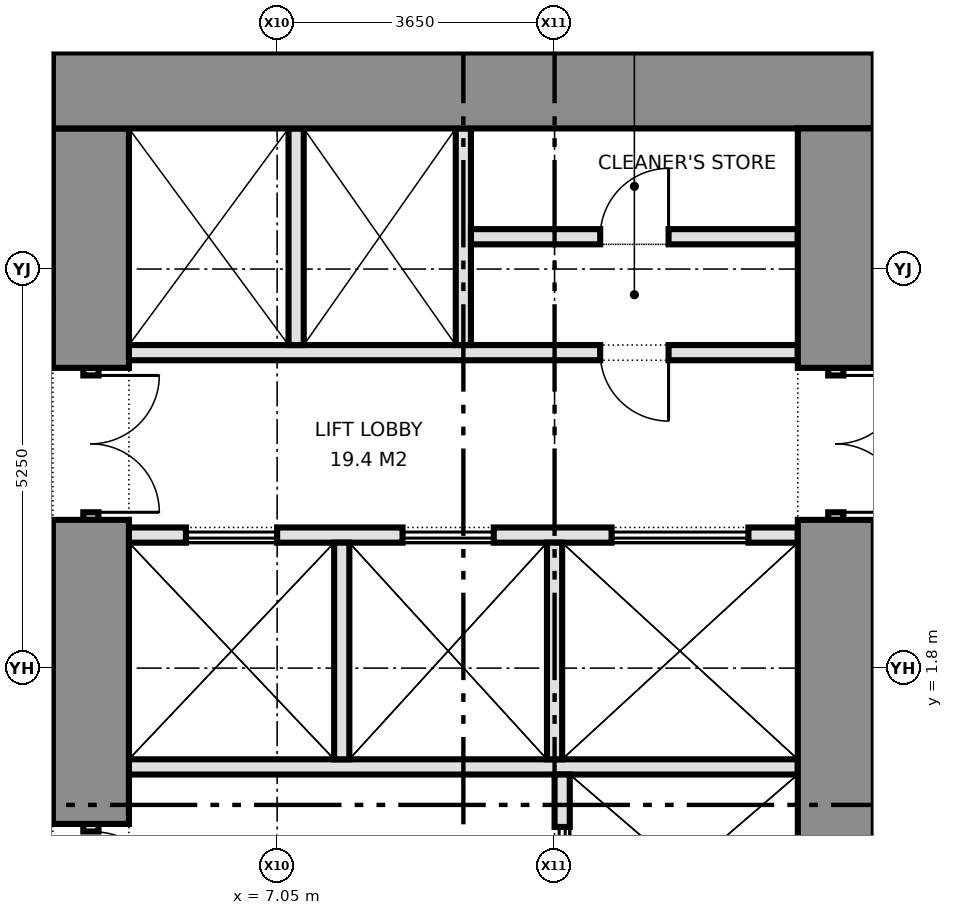
"""IFC4 building model, lengths in metres.
Left out: names, types, materials, properties, quantities, classifications, styles, units other than length and angle.
Written with IfcOpenShell. Run it as: python <this file> out.ifc"""

import sys

from ifc_helpers import new_model, si_unit, direction, frame, frame_2d, origin, place, context, subcontext, project, spatial, rectangle, extrude, element, fill, save


model = new_model("IFC4")
c1 = context("Model", 3, precision=1e-05, world=origin(), true_north=direction((0.0, 1.0)))
c2 = subcontext(c1, "Body", "Model", "MODEL_VIEW")
j1 = project(units=[si_unit("LENGTHUNIT", "METRE"), si_unit("PLANEANGLEUNIT", "RADIAN")], contexts=[c1])
p1 = place(None, origin())
s1 = spatial("IfcSite", under=j1, at=p1, CompositionType="ELEMENT")
p2 = place(p1, origin())
s2 = spatial("IfcBuilding", under=s1, at=p2, CompositionType="ELEMENT")
p3 = place(p2, frame((0.0, 0.0, 90.8)))
s3 = spatial("IfcBuildingStorey", under=s2, at=p3, CompositionType="ELEMENT", Elevation=90.8)
p4 = place(p3, frame((14.9, 9.4, 0.0), z_axis=(0.0, 0.0, 1.0), x_axis=(-1.0, 0.0, 0.0)))
e1 = element("IfcWall", 1, at=p4, inside=s3, PredefinedType="SHEAR", context=c2, shape_type="SweptSolid", body=[
    extrude(rectangle(XDim=10.8, YDim=1.0, at=frame_2d((5.4, 0.0))), origin(), (0.0, 0.0, 1.0), 4.2),
])
p5 = place(p3, frame((14.4, 8.9, 0.0), z_axis=(0.0, 0.0, 1.0), x_axis=(0.0, -1.0, 0.0)))
e2 = element("IfcWall", 2, at=p5, inside=s3, PredefinedType="SHEAR", context=c2, shape_type="SweptSolid", body=[
    extrude(rectangle(XDim=3.15, YDim=1.0, at=frame_2d((1.575, 0.0))), origin(), (0.0, 0.0, 1.0), 4.2),
])
p6 = place(p3, frame((14.4, 5.75, 0.0), z_axis=(0.0, 0.0, 1.0), x_axis=(0.0, -1.0, 0.0)))
e3 = element("IfcWall", 3, at=p6, inside=s3, PredefinedType="PARTITIONING", context=c2, shape_type="SweptSolid", body=[
    extrude(rectangle(XDim=2.0, YDim=0.2, at=frame_2d((1.0, 0.0))), origin(), (0.0, 0.0, 1.0), 2.4),
])
p7 = place(p6, frame((0.1, 0.0, 0.0)))
e4 = element("IfcOpeningElement", 4, at=p7, cuts=e3, PredefinedType="OPENING", context=c2, shape_type="SweptSolid", body=[
    extrude(rectangle(XDim=1.8, YDim=2.1, at=frame_2d((0.9, 1.05))), frame((0.0, 0.11, 0.0), z_axis=(0.0, -1.0, 0.0), x_axis=(1.0, 0.0, 0.0)), (0.0, 0.0, 1.0), 0.22),
])
p8 = place(p3, frame((14.4, 3.75, 0.0), z_axis=(0.0, 0.0, 1.0), x_axis=(0.0, -1.0, 0.0)))
e5 = element("IfcWall", 5, at=p8, inside=s3, PredefinedType="SHEAR", context=c2, shape_type="SweptSolid", body=[
    extrude(rectangle(XDim=6.13, YDim=1.0, at=frame_2d((3.065, 0.0))), origin(), (0.0, 0.0, 1.0), 4.2),
])
p9 = place(p3, frame((4.6, 8.9, 0.0), z_axis=(0.0, 0.0, 1.0), x_axis=(0.0, -1.0, 0.0)))
e6 = element("IfcWall", 6, at=p9, inside=s3, PredefinedType="SHEAR", context=c2, shape_type="SweptSolid", body=[
    extrude(rectangle(XDim=3.15, YDim=1.0, at=frame_2d((1.575, 0.0))), origin(), (0.0, 0.0, 1.0), 4.2),
])
p10 = place(p3, frame((4.6, 5.75, 0.0), z_axis=(0.0, 0.0, 1.0), x_axis=(0.0, -1.0, 0.0)))
e7 = element("IfcWall", 7, at=p10, inside=s3, PredefinedType="PARTITIONING", context=c2, shape_type="SweptSolid", body=[
    extrude(rectangle(XDim=2.0, YDim=0.2, at=frame_2d((1.0, 0.0))), origin(), (0.0, 0.0, 1.0), 2.4),
])
p11 = place(p10, frame((0.1, 0.0, 0.0)))
e8 = element("IfcOpeningElement", 8, at=p11, cuts=e7, PredefinedType="OPENING", context=c2, shape_type="SweptSolid", body=[
    extrude(rectangle(XDim=1.8, YDim=2.1, at=frame_2d((0.9, 1.05))), frame((0.0, 0.11, 0.0), z_axis=(0.0, -1.0, 0.0), x_axis=(1.0, 0.0, 0.0)), (0.0, 0.0, 1.0), 0.22),
])
p12 = place(p3, frame((4.6, 3.75, 0.0), z_axis=(0.0, 0.0, 1.0), x_axis=(0.0, -1.0, 0.0)))
e9 = element("IfcWall", 9, at=p12, inside=s3, PredefinedType="SHEAR", context=c2, shape_type="SweptSolid", body=[
    extrude(rectangle(XDim=4.0, YDim=1.0, at=frame_2d((2.0, 0.0))), origin(), (0.0, 0.0, 1.0), 4.2),
])
p13 = place(p3, frame((4.6, -0.25, 0.0), z_axis=(0.0, 0.0, 1.0), x_axis=(0.0, -1.0, 0.0)))
e10 = element("IfcWall", 10, at=p13, inside=s3, PredefinedType="PARTITIONING", context=c2, shape_type="SweptSolid", body=[
    extrude(rectangle(XDim=1.3, YDim=0.2, at=frame_2d((0.65, 0.0))), origin(), (0.0, 0.0, 1.0), 2.4),
])
p14 = place(p13, frame((0.1, 0.0, 0.0)))
e11 = element("IfcOpeningElement", 11, at=p14, cuts=e10, PredefinedType="OPENING", context=c2, shape_type="SweptSolid", body=[
    extrude(rectangle(XDim=1.1, YDim=2.1, at=frame_2d((0.55, 1.05))), frame((0.0, 0.11, 0.0), z_axis=(0.0, -1.0, 0.0), x_axis=(1.0, 0.0, 0.0)), (0.0, 0.0, 1.0), 0.22),
])
p15 = place(p3, frame((13.9, 5.95, 0.0), z_axis=(0.0, 0.0, 1.0), x_axis=(-1.0, 0.0, 0.0)))
e12 = element("IfcWall", 12, at=p15, inside=s3, PredefinedType="PARTITIONING", context=c2, shape_type="SweptSolid", body=[
    extrude(rectangle(XDim=8.8, YDim=0.2, at=frame_2d((4.4, 0.0))), origin(), (0.0, 0.0, 1.0), 4.2),
])
p16 = place(p15, frame((1.7, 0.0, 0.0)))
e13 = element("IfcOpeningElement", 13, at=p16, cuts=e12, PredefinedType="OPENING", context=c2, shape_type="SweptSolid", body=[
    extrude(rectangle(XDim=0.9, YDim=2.1, at=frame_2d((0.45, 1.05))), frame((0.0, 0.11, 0.0), z_axis=(0.0, -1.0, 0.0), x_axis=(1.0, 0.0, 0.0)), (0.0, 0.0, 1.0), 0.22),
])
p17 = place(p3, frame((13.9, 3.55, 0.0), z_axis=(0.0, 0.0, 1.0), x_axis=(-1.0, 0.0, 0.0)))
e14 = element("IfcWall", 14, at=p17, inside=s3, PredefinedType="PARTITIONING", context=c2, shape_type="SweptSolid", body=[
    extrude(rectangle(XDim=8.8, YDim=0.2, at=frame_2d((4.4, 0.0))), origin(), (0.0, 0.0, 1.0), 4.2),
])
p18 = place(p17, frame((0.65, 0.0, 0.0)))
e15 = element("IfcOpeningElement", 15, at=p18, cuts=e14, PredefinedType="OPENING", context=c2, shape_type="SweptSolid", body=[
    extrude(rectangle(XDim=1.8, YDim=2.1, at=frame_2d((0.9, 1.05))), frame((0.0, 0.11, 0.0), z_axis=(0.0, -1.0, 0.0), x_axis=(1.0, 0.0, 0.0)), (0.0, 0.0, 1.0), 0.22),
])
p19 = place(p17, frame((4.0, 0.0, 0.0)))
e16 = element("IfcOpeningElement", 16, at=p19, cuts=e14, PredefinedType="OPENING", context=c2, shape_type="SweptSolid", body=[
    extrude(rectangle(XDim=1.2, YDim=2.1, at=frame_2d((0.6, 1.05))), frame((0.0, 0.11, 0.0), z_axis=(0.0, -1.0, 0.0), x_axis=(1.0, 0.0, 0.0)), (0.0, 0.0, 1.0), 0.22),
])
p20 = place(p17, frame((6.85, 0.0, 0.0)))
e17 = element("IfcOpeningElement", 17, at=p20, cuts=e14, PredefinedType="OPENING", context=c2, shape_type="SweptSolid", body=[
    extrude(rectangle(XDim=1.2, YDim=2.1, at=frame_2d((0.6, 1.05))), frame((0.0, 0.11, 0.0), z_axis=(0.0, -1.0, 0.0), x_axis=(1.0, 0.0, 0.0)), (0.0, 0.0, 1.0), 0.22),
])
p21 = place(p3, frame((13.9, 0.5, 0.0), z_axis=(0.0, 0.0, 1.0), x_axis=(-1.0, 0.0, 0.0)))
e18 = element("IfcWall", 18, at=p21, inside=s3, PredefinedType="PARTITIONING", context=c2, shape_type="SweptSolid", body=[
    extrude(rectangle(XDim=8.8, YDim=0.2, at=frame_2d((4.4, 0.0))), origin(), (0.0, 0.0, 1.0), 4.2),
])
p22 = place(p3, frame((10.8, 0.4, 0.0), z_axis=(0.0, 0.0, 1.0), x_axis=(0.0, -1.0, 0.0)))
e19 = element("IfcWall", 19, at=p22, inside=s3, PredefinedType="PARTITIONING", context=c2, shape_type="SweptSolid", body=[
    extrude(rectangle(XDim=2.58, YDim=0.2, at=frame_2d((1.29, 0.0))), origin(), (0.0, 0.0, 1.0), 4.2),
])
p23 = place(p22, frame((0.69, 0.0, 0.0)))
e20 = element("IfcOpeningElement", 20, at=p23, cuts=e19, PredefinedType="OPENING", context=c2, shape_type="SweptSolid", body=[
    extrude(rectangle(XDim=1.2, YDim=2.1, at=frame_2d((0.6, 1.05))), frame((0.0, 0.11, 0.0), z_axis=(0.0, -1.0, 0.0), x_axis=(1.0, 0.0, 0.0)), (0.0, 0.0, 1.0), 0.22),
])
for number, where, z_axis, x_axis in (
    (21, (9.5, 8.9, 0.0), (0.0, 0.0, 1.0), (0.0, -1.0, 0.0)),
    (22, (7.3, 8.9, 0.0), (0.0, 0.0, 1.0), (0.0, -1.0, 0.0)),
):
    element("IfcWall", number, at=place(p3, frame(where, z_axis=z_axis, x_axis=x_axis)), inside=s3, PredefinedType="PARTITIONING", context=c2, shape_type="SweptSolid", body=[
        extrude(rectangle(XDim=2.85, YDim=0.2, at=frame_2d((1.425, 0.0))), origin(), (0.0, 0.0, 1.0), 4.2),
    ])
p24 = place(p3, frame((13.9, 7.475, 0.0), z_axis=(0.0, 0.0, 1.0), x_axis=(-1.0, 0.0, 0.0)))
e23 = element("IfcWall", 23, at=p24, inside=s3, PredefinedType="PARTITIONING", context=c2, shape_type="SweptSolid", body=[
    extrude(rectangle(XDim=4.3, YDim=0.2, at=frame_2d((2.15, 0.0))), origin(), (0.0, 0.0, 1.0), 4.2),
])
p25 = place(p24, frame((1.7, 0.0, 0.0)))
e24 = element("IfcOpeningElement", 24, at=p25, cuts=e23, PredefinedType="OPENING", context=c2, shape_type="SweptSolid", body=[
    extrude(rectangle(XDim=0.9, YDim=2.1, at=frame_2d((0.45, 1.05))), frame((0.0, 0.11, 0.0), z_axis=(0.0, -1.0, 0.0), x_axis=(1.0, 0.0, 0.0)), (0.0, 0.0, 1.0), 0.22),
])
for number, where, z_axis, x_axis in (
    (25, (10.7, 3.45, 0.0), (0.0, 0.0, 1.0), (0.0, -1.0, 0.0)),
    (26, (7.9, 3.45, 0.0), (0.0, 0.0, 1.0), (0.0, -1.0, 0.0)),
):
    element("IfcWall", number, at=place(p3, frame(where, z_axis=z_axis, x_axis=x_axis)), inside=s3, PredefinedType="PARTITIONING", context=c2, shape_type="SweptSolid", body=[
        extrude(rectangle(XDim=2.85, YDim=0.2, at=frame_2d((1.425, 0.0))), origin(), (0.0, 0.0, 1.0), 4.2),
    ])
p26 = place(p7, origin())
e27 = element("IfcDoor", 27, at=p26, inside=s3, OperationType="DOUBLE_DOOR_SINGLE_SWING", PredefinedType="DOOR", context=c2, shape_type="SweptSolid", body=[
    extrude(rectangle(XDim=1.8, YDim=2.1, at=frame_2d((0.9, 1.05))), frame((0.0, 0.025, 0.0), z_axis=(0.0, -1.0, 0.0), x_axis=(1.0, 0.0, 0.0)), (0.0, 0.0, 1.0), 0.05),
])
fill(e4, e27)
p27 = place(p11, origin())
e28 = element("IfcDoor", 28, at=p27, inside=s3, OperationType="DOUBLE_DOOR_SINGLE_SWING", PredefinedType="DOOR", context=c2, shape_type="SweptSolid", body=[
    extrude(rectangle(XDim=1.8, YDim=2.1, at=frame_2d((0.9, 1.05))), frame((0.0, 0.025, 0.0), z_axis=(0.0, -1.0, 0.0), x_axis=(1.0, 0.0, 0.0)), (0.0, 0.0, 1.0), 0.05),
])
fill(e8, e28)
p28 = place(p14, origin())
e29 = element("IfcDoor", 29, at=p28, inside=s3, OperationType="SINGLE_SWING_RIGHT", PredefinedType="DOOR", context=c2, shape_type="SweptSolid", body=[
    extrude(rectangle(XDim=1.1, YDim=2.1, at=frame_2d((0.55, 1.05))), frame((0.0, 0.025, 0.0), z_axis=(0.0, -1.0, 0.0), x_axis=(1.0, 0.0, 0.0)), (0.0, 0.0, 1.0), 0.05),
])
fill(e11, e29)
p29 = place(p18, origin())
e30 = element("IfcDoor", 30, at=p29, inside=s3, OperationType="DOUBLE_DOOR_SLIDING", PredefinedType="DOOR", context=c2, shape_type="SweptSolid", body=[
    extrude(rectangle(XDim=1.8, YDim=2.1, at=frame_2d((0.9, 1.05))), frame((0.0, 0.025, 0.0), z_axis=(0.0, -1.0, 0.0), x_axis=(1.0, 0.0, 0.0)), (0.0, 0.0, 1.0), 0.05),
])
fill(e15, e30)
p30 = place(p19, origin())
e31 = element("IfcDoor", 31, at=p30, inside=s3, OperationType="DOUBLE_DOOR_SLIDING", PredefinedType="DOOR", context=c2, shape_type="SweptSolid", body=[
    extrude(rectangle(XDim=1.2, YDim=2.1, at=frame_2d((0.6, 1.05))), frame((0.0, 0.025, 0.0), z_axis=(0.0, -1.0, 0.0), x_axis=(1.0, 0.0, 0.0)), (0.0, 0.0, 1.0), 0.05),
])
fill(e16, e31)
p31 = place(p20, origin())
e32 = element("IfcDoor", 32, at=p31, inside=s3, OperationType="DOUBLE_DOOR_SLIDING", PredefinedType="DOOR", context=c2, shape_type="SweptSolid", body=[
    extrude(rectangle(XDim=1.2, YDim=2.1, at=frame_2d((0.6, 1.05))), frame((0.0, 0.025, 0.0), z_axis=(0.0, -1.0, 0.0), x_axis=(1.0, 0.0, 0.0)), (0.0, 0.0, 1.0), 0.05),
])
fill(e17, e32)
p32 = place(p23, origin())
e33 = element("IfcDoor", 33, at=p32, inside=s3, OperationType="DOUBLE_DOOR_SLIDING", PredefinedType="DOOR", context=c2, shape_type="SweptSolid", body=[
    extrude(rectangle(XDim=1.2, YDim=2.1, at=frame_2d((0.6, 1.05))), frame((0.0, 0.025, 0.0), z_axis=(0.0, -1.0, 0.0), x_axis=(1.0, 0.0, 0.0)), (0.0, 0.0, 1.0), 0.05),
])
fill(e20, e33)
p33 = place(p16, origin())
e34 = element("IfcDoor", 34, at=p33, inside=s3, OperationType="SINGLE_SWING_LEFT", PredefinedType="DOOR", context=c2, shape_type="SweptSolid", body=[
    extrude(rectangle(XDim=0.9, YDim=2.1, at=frame_2d((0.45, 1.05))), frame((0.0, 0.025, 0.0), z_axis=(0.0, -1.0, 0.0), x_axis=(1.0, 0.0, 0.0)), (0.0, 0.0, 1.0), 0.05),
])
fill(e13, e34)
p34 = place(p25, frame((0.9, 0.0, 0.0), z_axis=(0.0, 0.0, 1.0), x_axis=(-1.0, 0.0, 0.0)))
e35 = element("IfcDoor", 35, at=p34, inside=s3, OperationType="SINGLE_SWING_RIGHT", PredefinedType="DOOR", context=c2, shape_type="SweptSolid", body=[
    extrude(rectangle(XDim=0.9, YDim=2.1, at=frame_2d((0.45, 1.05))), frame((0.0, 0.025, 0.0), z_axis=(0.0, -1.0, 0.0), x_axis=(1.0, 0.0, 0.0)), (0.0, 0.0, 1.0), 0.05),
])
fill(e24, e35)
save(model, sys.argv[1])
